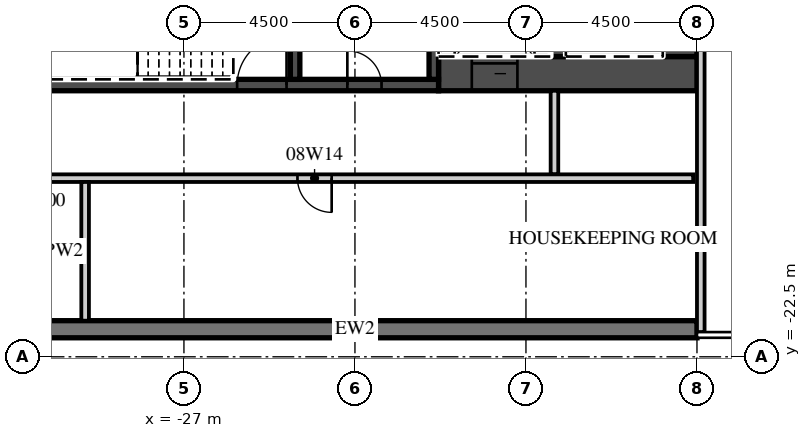
"""IFC4 building model, lengths in metres.
Left out: names, types, materials, properties, quantities, classifications, styles, units other than length and angle.
Written with IfcOpenShell. Run it as: python <this file> out.ifc"""

import sys

from ifc_helpers import new_model, si_unit, direction, frame, frame_2d, origin, place, context, subcontext, project, spatial, rectangle, extrude, element, fill, save


model = new_model("IFC4")
c1 = context("Model", 3, precision=1e-05, world=origin(), true_north=direction((0.0, 1.0)))
c2 = subcontext(c1, "Body", "Model", "MODEL_VIEW")
j1 = project(units=[si_unit("LENGTHUNIT", "METRE"), si_unit("PLANEANGLEUNIT", "RADIAN")], contexts=[c1])
p1 = place(None, origin())
s1 = spatial("IfcSite", under=j1, at=p1, CompositionType="ELEMENT")
p2 = place(p1, origin())
s2 = spatial("IfcBuilding", under=s1, at=p2, CompositionType="ELEMENT")
p3 = place(p2, frame((0.0, 0.0, 53.0)))
s3 = spatial("IfcBuildingStorey", under=s2, at=p3, CompositionType="ELEMENT", Elevation=53.0)
p4 = place(p3, frame((-31.5, -21.775, 0.0), z_axis=(0.0, 0.0, 1.0), x_axis=(1.0, 0.0, 0.0)))
e1 = element("IfcWall", 1, at=p4, inside=s3, PredefinedType="SOLIDWALL", context=c2, shape_type="SweptSolid", body=[
    extrude(rectangle(XDim=18.0, YDim=0.45, at=frame_2d((9.0, 0.0))), origin(), (0.0, 0.0, 1.0), 6.72),
])
p5 = place(p3, frame((-20.3, -15.05, 0.0), z_axis=(0.0, 0.0, 1.0), x_axis=(1.0, 0.0, 0.0)))
e2 = element("IfcWall", 2, at=p5, inside=s3, PredefinedType="SHEAR", context=c2, shape_type="SweptSolid", body=[
    extrude(rectangle(XDim=6.8, YDim=0.9, at=frame_2d((3.4, 0.0))), origin(), (0.0, 0.0, 1.0), 6.72),
])
p6 = place(p5, frame((0.875, 0.0, 0.0)))
e3 = element("IfcOpeningElement", 3, at=p6, cuts=e2, PredefinedType="OPENING", context=c2, shape_type="SweptSolid", body=[
    extrude(rectangle(XDim=1.2, YDim=2.1, at=frame_2d((0.6, 1.05))), frame((0.0, 0.46, 0.0), z_axis=(0.0, -1.0, 0.0), x_axis=(1.0, 0.0, 0.0)), (0.0, 0.0, 1.0), 0.92),
])
p7 = place(p3, frame((-30.6, -15.35, 0.0), z_axis=(0.0, 0.0, 1.0), x_axis=(1.0, 0.0, 0.0)))
e4 = element("IfcWall", 4, at=p7, inside=s3, PredefinedType="SHEAR", context=c2, shape_type="SweptSolid", body=[
    extrude(rectangle(XDim=10.3, YDim=0.3, at=frame_2d((5.15, 0.0))), origin(), (0.0, 0.0, 1.0), 6.72),
])
p8 = place(p7, frame((5.0, 0.0, 0.0)))
e5 = element("IfcOpeningElement", 5, at=p8, cuts=e4, PredefinedType="OPENING", context=c2, shape_type="SweptSolid", body=[
    extrude(rectangle(XDim=1.3, YDim=2.1, at=frame_2d((0.65, 1.05))), frame((0.0, 0.16, 0.0), z_axis=(0.0, -1.0, 0.0), x_axis=(1.0, 0.0, 0.0)), (0.0, 0.0, 1.0), 0.32),
])
p9 = place(p7, frame((7.9, 0.0, 0.0)))
e6 = element("IfcOpeningElement", 6, at=p9, cuts=e4, PredefinedType="OPENING", context=c2, shape_type="SweptSolid", body=[
    extrude(rectangle(XDim=0.9, YDim=2.1, at=frame_2d((0.45, 1.05))), frame((0.0, 0.16, 0.0), z_axis=(0.0, -1.0, 0.0), x_axis=(1.0, 0.0, 0.0)), (0.0, 0.0, 1.0), 0.32),
])
p10 = place(p3, frame((-13.95, -14.6, 0.0), z_axis=(0.0, 0.0, 1.0), x_axis=(0.0, 1.0, 0.0)))
e7 = element("IfcWall", 7, at=p10, inside=s3, PredefinedType="SHEAR", context=c2, shape_type="SweptSolid", body=[
    extrude(rectangle(XDim=12.2, YDim=0.9, at=frame_2d((6.1, 0.0))), origin(), (0.0, 0.0, 1.0), 6.72),
])
p11 = place(p3, frame((-17.15, -14.6, 0.0), z_axis=(0.0, 0.0, 1.0), x_axis=(0.0, 1.0, 0.0)))
e8 = element("IfcWall", 8, at=p11, inside=s3, PredefinedType="SHEAR", context=c2, shape_type="SweptSolid", body=[
    extrude(rectangle(XDim=5.8, YDim=0.4, at=frame_2d((2.9, 0.0))), origin(), (0.0, 0.0, 1.0), 6.72),
])
for number, where, z_axis, x_axis in (
    (9, (-20.425, -15.2, 0.0), (0.0, 0.0, 1.0), (0.0, 1.0, 0.0)),
    (10, (-24.075, -15.2, 0.0), (0.0, 0.0, 1.0), (0.0, 1.0, 0.0)),
):
    element("IfcWall", number, at=place(p3, frame(where, z_axis=z_axis, x_axis=x_axis)), inside=s3, PredefinedType="SHEAR", context=c2, shape_type="SweptSolid", body=[
        extrude(rectangle(XDim=3.25, YDim=0.25, at=frame_2d((1.625, 0.0))), origin(), (0.0, 0.0, 1.0), 6.72),
    ])
p12 = place(p3, frame((-17.25, -17.7, 0.0), z_axis=(0.0, 0.0, 1.0), x_axis=(0.0, 1.0, 0.0)))
e11 = element("IfcWall", 11, at=p12, inside=s3, PredefinedType="PARTITIONING", context=c2, shape_type="SweptSolid", body=[
    extrude(rectangle(XDim=2.2, YDim=0.2, at=frame_2d((1.1, 0.0))), origin(), (0.0, 0.0, 1.0), 6.72),
])
p13 = place(p3, frame((-44.85, -17.8, 0.0), z_axis=(0.0, 0.0, 1.0), x_axis=(1.0, 0.0, 0.0)))
e12 = element("IfcWall", 12, at=p13, inside=s3, PredefinedType="PARTITIONING", context=c2, shape_type="SweptSolid", body=[
    extrude(rectangle(XDim=31.25, YDim=0.2, at=frame_2d((15.625, 0.0))), origin(), (0.0, 0.0, 1.0), 6.72),
])
p14 = place(p13, frame((12.538, 0.0, 0.0)))
e13 = element("IfcOpeningElement", 13, at=p14, cuts=e12, PredefinedType="OPENING", context=c2, shape_type="SweptSolid", body=[
    extrude(rectangle(XDim=0.9, YDim=2.1, at=frame_2d((0.45, 1.05))), frame((0.0, 0.11, 0.0), z_axis=(0.0, -1.0, 0.0), x_axis=(1.0, 0.0, 0.0)), (0.0, 0.0, 1.0), 0.22),
])
p15 = place(p13, frame((20.837, 0.0, 0.0)))
e14 = element("IfcOpeningElement", 14, at=p15, cuts=e12, PredefinedType="OPENING", context=c2, shape_type="SweptSolid", body=[
    extrude(rectangle(XDim=0.9, YDim=2.1, at=frame_2d((0.45, 1.05))), frame((0.0, 0.11, 0.0), z_axis=(0.0, -1.0, 0.0), x_axis=(1.0, 0.0, 0.0)), (0.0, 0.0, 1.0), 0.22),
])
p16 = place(p3, frame((-29.6, -21.55, 0.0), z_axis=(0.0, 0.0, 1.0), x_axis=(0.0, 1.0, 0.0)))
e15 = element("IfcWall", 15, at=p16, inside=s3, PredefinedType="PARTITIONING", context=c2, shape_type="SweptSolid", body=[
    extrude(rectangle(XDim=3.65, YDim=0.2, at=frame_2d((1.825, 0.0))), origin(), (0.0, 0.0, 1.0), 6.72),
])
p17 = place(p3, frame((-13.4, -21.85, 0.0), z_axis=(0.0, 0.0, 1.0), x_axis=(0.0, 1.0, 0.0)))
e16 = element("IfcWall", 16, at=p17, inside=s3, PredefinedType="PARTITIONING", context=c2, shape_type="SweptSolid", body=[
    extrude(rectangle(XDim=20.15, YDim=0.2, at=frame_2d((10.075, 0.0))), origin(), (0.0, 0.0, 1.0), 6.72),
])
p18 = place(p6, origin())
e17 = element("IfcDoor", 17, at=p18, inside=s3, OperationType="SLIDING_TO_LEFT", PredefinedType="DOOR", context=c2, shape_type="SweptSolid", body=[
    extrude(rectangle(XDim=1.2, YDim=2.1, at=frame_2d((0.6, 1.05))), frame((0.0, 0.025, 0.0), z_axis=(0.0, -1.0, 0.0), x_axis=(1.0, 0.0, 0.0)), (0.0, 0.0, 1.0), 0.05),
])
fill(e3, e17)
p19 = place(p8, origin())
e18 = element("IfcDoor", 18, at=p19, inside=s3, OperationType="SINGLE_SWING_RIGHT", PredefinedType="DOOR", context=c2, shape_type="SweptSolid", body=[
    extrude(rectangle(XDim=1.3, YDim=2.1, at=frame_2d((0.65, 1.05))), frame((0.0, 0.025, 0.0), z_axis=(0.0, -1.0, 0.0), x_axis=(1.0, 0.0, 0.0)), (0.0, 0.0, 1.0), 0.05),
])
fill(e5, e18)
p20 = place(p9, origin())
e19 = element("IfcDoor", 19, at=p20, inside=s3, OperationType="SINGLE_SWING_LEFT", PredefinedType="DOOR", context=c2, shape_type="SweptSolid", body=[
    extrude(rectangle(XDim=0.9, YDim=2.1, at=frame_2d((0.45, 1.05))), frame((0.0, 0.025, 0.0), z_axis=(0.0, -1.0, 0.0), x_axis=(1.0, 0.0, 0.0)), (0.0, 0.0, 1.0), 0.05),
])
fill(e6, e19)
p21 = place(p15, origin())
e20 = element("IfcDoor", 20, at=p21, inside=s3, OperationType="SINGLE_SWING_RIGHT", PredefinedType="DOOR", context=c2, shape_type="SweptSolid", body=[
    extrude(rectangle(XDim=0.9, YDim=2.1, at=frame_2d((0.45, 1.05))), frame((0.0, 0.025, 0.0), z_axis=(0.0, -1.0, 0.0), x_axis=(1.0, 0.0, 0.0)), (0.0, 0.0, 1.0), 0.05),
])
fill(e14, e20)
save(model, sys.argv[1])
